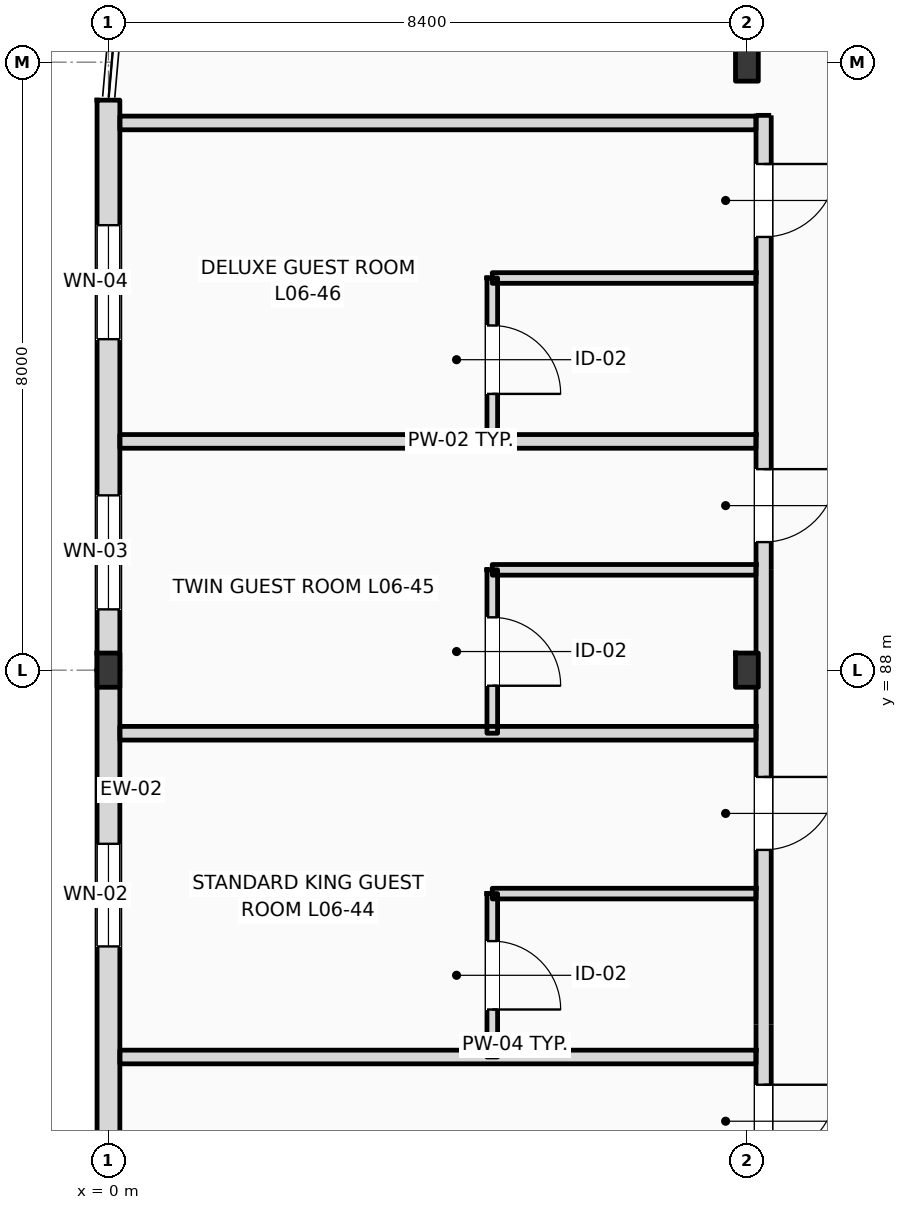
"""IFC4 building model, lengths in metres.
Left out: names, types, materials, properties, quantities, classifications, styles, units other than length and angle.
Written with IfcOpenShell. Run it as: python <this file> out.ifc"""

import sys

from ifc_helpers import new_model, si_unit, direction, frame, frame_2d, origin, origin_2d, place, context, subcontext, project, spatial, rectangle, i_section, extrude, element, fill, save


model = new_model("IFC4")
c1 = context("Model", 3, precision=1e-05, world=origin(), true_north=direction((0.0, 1.0)))
c2 = subcontext(c1, "Body", "Model", "MODEL_VIEW")
j1 = project(units=[si_unit("LENGTHUNIT", "METRE"), si_unit("PLANEANGLEUNIT", "RADIAN")], contexts=[c1])
p1 = place(None, origin())
s1 = spatial("IfcSite", under=j1, at=p1, CompositionType="ELEMENT")
p2 = place(p1, origin())
s2 = spatial("IfcBuilding", under=s1, at=p2, CompositionType="ELEMENT")
p3 = place(p2, frame((0.0, 0.0, 28.2)))
s3 = spatial("IfcBuildingStorey", under=s2, at=p3, CompositionType="ELEMENT", Elevation=28.2)
for number, where, z_axis, x_axis in (
    (1, (0.0, 88.0, 0.0), (0.0, 0.0, 1.0), (1.0, 0.0, 0.0)),
    (2, (8.4, 88.0, 0.0), (0.0, 0.0, 1.0), (1.0, 0.0, 0.0)),
):
    element("IfcColumn", number, at=place(p3, frame(where, z_axis=z_axis, x_axis=x_axis)), inside=s3, PredefinedType="COLUMN", context=c2, shape_type="SweptSolid", body=[
        extrude(i_section(OverallWidth=0.3, OverallDepth=0.45, WebThickness=0.014, FlangeThickness=0.026, FilletRadius=0.027, at=origin_2d()), origin(), (0.0, 0.0, 1.0), 3.6),
    ])
p4 = place(p3, frame((8.4, 96.0, 0.0), z_axis=(0.0, 0.0, 1.0), x_axis=(1.0, 0.0, 0.0)))
e3 = element("IfcColumn", 3, at=p4, inside=s3, PredefinedType="COLUMN", context=c2, shape_type="SweptSolid", body=[
    extrude(i_section(OverallWidth=0.3, OverallDepth=0.5, WebThickness=0.014, FlangeThickness=0.028, FilletRadius=0.027, at=origin_2d()), origin(), (0.0, 0.0, 1.0), 3.6),
])
p5 = place(p3, frame((0.0, 79.5, 0.0), z_axis=(0.0, 0.0, 1.0), x_axis=(0.0, 1.0, 0.0)))
e4 = element("IfcWall", 4, at=p5, inside=s3, PredefinedType="STANDARD", context=c2, shape_type="SweptSolid", body=[
    extrude(rectangle(XDim=8.5, YDim=0.3, at=frame_2d((4.25, 0.0))), origin(), (0.0, 0.0, 1.0), 2.99),
])
p6 = place(p5, frame((0.89, 0.0, 0.9)))
e5 = element("IfcOpeningElement", 5, at=p6, cuts=e4, PredefinedType="OPENING", context=c2, shape_type="SweptSolid", body=[
    extrude(rectangle(XDim=1.2, YDim=1.8, at=frame_2d((0.6, 0.9))), frame((0.0, 0.16, 0.0), z_axis=(0.0, -1.0, 0.0), x_axis=(1.0, 0.0, 0.0)), (0.0, 0.0, 1.0), 0.32),
])
p7 = place(p5, frame((4.865, 0.0, 0.9)))
e6 = element("IfcOpeningElement", 6, at=p7, cuts=e4, PredefinedType="OPENING", context=c2, shape_type="SweptSolid", body=[
    extrude(rectangle(XDim=1.35, YDim=1.85, at=frame_2d((0.675, 0.925))), frame((0.0, 0.16, 0.0), z_axis=(0.0, -1.0, 0.0), x_axis=(1.0, 0.0, 0.0)), (0.0, 0.0, 1.0), 0.32),
])
p8 = place(p3, frame((0.0, 88.0, 0.0), z_axis=(0.0, 0.0, 1.0), x_axis=(0.0, 1.0, 0.0)))
e7 = element("IfcWall", 7, at=p8, inside=s3, PredefinedType="STANDARD", context=c2, shape_type="SweptSolid", body=[
    extrude(rectangle(XDim=7.5, YDim=0.3, at=frame_2d((3.75, 0.0))), origin(), (0.0, 0.0, 1.0), 3.36),
])
p9 = place(p8, frame((0.8, 0.0, 0.9)))
e8 = element("IfcOpeningElement", 8, at=p9, cuts=e7, PredefinedType="OPENING", context=c2, shape_type="SweptSolid", body=[
    extrude(rectangle(XDim=1.5, YDim=1.9, at=frame_2d((0.75, 0.95))), frame((0.0, 0.16, 0.0), z_axis=(0.0, -1.0, 0.0), x_axis=(1.0, 0.0, 0.0)), (0.0, 0.0, 1.0), 0.32),
])
p10 = place(p8, frame((4.355, 0.0, 0.9)))
e9 = element("IfcOpeningElement", 9, at=p10, cuts=e7, PredefinedType="OPENING", context=c2, shape_type="SweptSolid", body=[
    extrude(rectangle(XDim=1.5, YDim=1.95, at=frame_2d((0.75, 0.975))), frame((0.0, 0.16, 0.0), z_axis=(0.0, -1.0, 0.0), x_axis=(1.0, 0.0, 0.0)), (0.0, 0.0, 1.0), 0.32),
])
p11 = place(p3, frame((8.62, 62.64, 0.0), z_axis=(0.0, 0.0, 1.0), x_axis=(0.0, 1.0, 0.0)))
e10 = element("IfcWall", 10, at=p11, inside=s3, PredefinedType="PARTITIONING", context=c2, shape_type="SweptSolid", body=[
    extrude(rectangle(XDim=32.66, YDim=0.2, at=frame_2d((16.33, 0.0))), origin(), (0.0, 0.0, 1.0), 2.99),
])
p12 = place(p11, frame((2.71, 0.0, 0.0)))
e11 = element("IfcOpeningElement", 11, at=p12, cuts=e10, PredefinedType="OPENING", context=c2, shape_type="SweptSolid", body=[
    extrude(rectangle(XDim=0.96, YDim=2.2, at=frame_2d((0.48, 1.1))), frame((0.0, 0.11, 0.0), z_axis=(0.0, -1.0, 0.0), x_axis=(1.0, 0.0, 0.0)), (0.0, 0.0, 1.0), 0.22),
])
p13 = place(p11, frame((4.645, 0.0, 0.0)))
e12 = element("IfcOpeningElement", 12, at=p13, cuts=e10, PredefinedType="OPENING", context=c2, shape_type="SweptSolid", body=[
    extrude(rectangle(XDim=0.96, YDim=2.2, at=frame_2d((0.48, 1.1))), frame((0.0, 0.11, 0.0), z_axis=(0.0, -1.0, 0.0), x_axis=(1.0, 0.0, 0.0)), (0.0, 0.0, 1.0), 0.22),
])
p14 = place(p11, frame((10.845, 0.0, 0.0)))
e13 = element("IfcOpeningElement", 13, at=p14, cuts=e10, PredefinedType="OPENING", context=c2, shape_type="SweptSolid", body=[
    extrude(rectangle(XDim=0.96, YDim=2.2, at=frame_2d((0.48, 1.1))), frame((0.0, 0.11, 0.0), z_axis=(0.0, -1.0, 0.0), x_axis=(1.0, 0.0, 0.0)), (0.0, 0.0, 1.0), 0.22),
])
p15 = place(p11, frame((12.745, 0.0, 0.0)))
e14 = element("IfcOpeningElement", 14, at=p15, cuts=e10, PredefinedType="OPENING", context=c2, shape_type="SweptSolid", body=[
    extrude(rectangle(XDim=0.96, YDim=2.2, at=frame_2d((0.48, 1.1))), frame((0.0, 0.11, 0.0), z_axis=(0.0, -1.0, 0.0), x_axis=(1.0, 0.0, 0.0)), (0.0, 0.0, 1.0), 0.22),
])
p16 = place(p11, frame((18.945, 0.0, 0.0)))
e15 = element("IfcOpeningElement", 15, at=p16, cuts=e10, PredefinedType="OPENING", context=c2, shape_type="SweptSolid", body=[
    extrude(rectangle(XDim=0.96, YDim=2.2, at=frame_2d((0.48, 1.1))), frame((0.0, 0.11, 0.0), z_axis=(0.0, -1.0, 0.0), x_axis=(1.0, 0.0, 0.0)), (0.0, 0.0, 1.0), 0.22),
])
p17 = place(p11, frame((22.995, 0.0, 0.0)))
e16 = element("IfcOpeningElement", 16, at=p17, cuts=e10, PredefinedType="OPENING", context=c2, shape_type="SweptSolid", body=[
    extrude(rectangle(XDim=0.96, YDim=2.2, at=frame_2d((0.48, 1.1))), frame((0.0, 0.11, 0.0), z_axis=(0.0, -1.0, 0.0), x_axis=(1.0, 0.0, 0.0)), (0.0, 0.0, 1.0), 0.22),
])
p18 = place(p11, frame((27.045, 0.0, 0.0)))
e17 = element("IfcOpeningElement", 17, at=p18, cuts=e10, PredefinedType="OPENING", context=c2, shape_type="SweptSolid", body=[
    extrude(rectangle(XDim=0.96, YDim=2.2, at=frame_2d((0.48, 1.1))), frame((0.0, 0.11, 0.0), z_axis=(0.0, -1.0, 0.0), x_axis=(1.0, 0.0, 0.0)), (0.0, 0.0, 1.0), 0.22),
])
p19 = place(p11, frame((31.06, 0.0, 0.0)))
e18 = element("IfcOpeningElement", 18, at=p19, cuts=e10, PredefinedType="OPENING", context=c2, shape_type="SweptSolid", body=[
    extrude(rectangle(XDim=0.96, YDim=2.2, at=frame_2d((0.48, 1.1))), frame((0.0, 0.11, 0.0), z_axis=(0.0, -1.0, 0.0), x_axis=(1.0, 0.0, 0.0)), (0.0, 0.0, 1.0), 0.22),
])
for number, where, z_axis, x_axis in (
    (19, (0.15, 82.91, 0.0), (0.0, 0.0, 1.0), (1.0, 0.0, 0.0)),
    (20, (0.15, 87.17, 0.0), (0.0, 0.0, 1.0), (1.0, 0.0, 0.0)),
):
    element("IfcWall", number, at=place(p3, frame(where, z_axis=z_axis, x_axis=x_axis)), inside=s3, PredefinedType="PARTITIONING", context=c2, shape_type="SweptSolid", body=[
        extrude(rectangle(XDim=8.37, YDim=0.18, at=frame_2d((4.185, 0.0))), origin(), (0.0, 0.0, 1.0), 3.36),
    ])
p20 = place(p3, frame((5.05, 85.06, 0.0), z_axis=(0.0, 0.0, 1.0), x_axis=(1.0, 0.0, 0.0)))
e21 = element("IfcWall", 21, at=p20, inside=s3, PredefinedType="PARTITIONING", context=c2, shape_type="SweptSolid", body=[
    extrude(rectangle(XDim=3.47, YDim=0.14, at=frame_2d((1.735, 0.0))), origin(), (0.0, 0.0, 1.0), 3.36),
])
p21 = place(p3, frame((5.05, 82.91, 0.0), z_axis=(0.0, 0.0, 1.0), x_axis=(0.0, 1.0, 0.0)))
e22 = element("IfcWall", 22, at=p21, inside=s3, PredefinedType="PARTITIONING", context=c2, shape_type="SweptSolid", body=[
    extrude(rectangle(XDim=2.15, YDim=0.14, at=frame_2d((1.075, 0.0))), origin(), (0.0, 0.0, 1.0), 3.36),
])
p22 = place(p21, frame((0.625, 0.0, 0.0)))
e23 = element("IfcOpeningElement", 23, at=p22, cuts=e22, PredefinedType="OPENING", context=c2, shape_type="SweptSolid", body=[
    extrude(rectangle(XDim=0.9, YDim=2.1, at=frame_2d((0.45, 1.05))), frame((0.0, 0.08, 0.0), z_axis=(0.0, -1.0, 0.0), x_axis=(1.0, 0.0, 0.0)), (0.0, 0.0, 1.0), 0.16),
])
p23 = place(p3, frame((0.15, 91.01, 0.0), z_axis=(0.0, 0.0, 1.0), x_axis=(1.0, 0.0, 0.0)))
e24 = element("IfcWall", 24, at=p23, inside=s3, PredefinedType="PARTITIONING", context=c2, shape_type="SweptSolid", body=[
    extrude(rectangle(XDim=8.37, YDim=0.18, at=frame_2d((4.185, 0.0))), origin(), (0.0, 0.0, 1.0), 3.36),
])
p24 = place(p3, frame((5.05, 89.32, 0.0), z_axis=(0.0, 0.0, 1.0), x_axis=(1.0, 0.0, 0.0)))
e25 = element("IfcWall", 25, at=p24, inside=s3, PredefinedType="PARTITIONING", context=c2, shape_type="SweptSolid", body=[
    extrude(rectangle(XDim=3.47, YDim=0.14, at=frame_2d((1.735, 0.0))), origin(), (0.0, 0.0, 1.0), 3.36),
])
p25 = place(p3, frame((5.05, 87.17, 0.0), z_axis=(0.0, 0.0, 1.0), x_axis=(0.0, 1.0, 0.0)))
e26 = element("IfcWall", 26, at=p25, inside=s3, PredefinedType="PARTITIONING", context=c2, shape_type="SweptSolid", body=[
    extrude(rectangle(XDim=2.15, YDim=0.14, at=frame_2d((1.075, 0.0))), origin(), (0.0, 0.0, 1.0), 3.36),
])
p26 = place(p25, frame((0.625, 0.0, 0.0)))
e27 = element("IfcOpeningElement", 27, at=p26, cuts=e26, PredefinedType="OPENING", context=c2, shape_type="SweptSolid", body=[
    extrude(rectangle(XDim=0.9, YDim=2.1, at=frame_2d((0.45, 1.05))), frame((0.0, 0.08, 0.0), z_axis=(0.0, -1.0, 0.0), x_axis=(1.0, 0.0, 0.0)), (0.0, 0.0, 1.0), 0.16),
])
p27 = place(p3, frame((0.15, 95.2, 0.0), z_axis=(0.0, 0.0, 1.0), x_axis=(1.0, 0.0, 0.0)))
e28 = element("IfcWall", 28, at=p27, inside=s3, PredefinedType="PARTITIONING", context=c2, shape_type="SweptSolid", body=[
    extrude(rectangle(XDim=8.37, YDim=0.18, at=frame_2d((4.185, 0.0))), origin(), (0.0, 0.0, 1.0), 3.36),
])
p28 = place(p3, frame((5.05, 93.16, 0.0), z_axis=(0.0, 0.0, 1.0), x_axis=(1.0, 0.0, 0.0)))
e29 = element("IfcWall", 29, at=p28, inside=s3, PredefinedType="PARTITIONING", context=c2, shape_type="SweptSolid", body=[
    extrude(rectangle(XDim=3.47, YDim=0.14, at=frame_2d((1.735, 0.0))), origin(), (0.0, 0.0, 1.0), 3.36),
])
p29 = place(p3, frame((5.05, 91.01, 0.0), z_axis=(0.0, 0.0, 1.0), x_axis=(0.0, 1.0, 0.0)))
e30 = element("IfcWall", 30, at=p29, inside=s3, PredefinedType="PARTITIONING", context=c2, shape_type="SweptSolid", body=[
    extrude(rectangle(XDim=2.15, YDim=0.14, at=frame_2d((1.075, 0.0))), origin(), (0.0, 0.0, 1.0), 3.36),
])
p30 = place(p29, frame((0.625, 0.0, 0.0)))
e31 = element("IfcOpeningElement", 31, at=p30, cuts=e30, PredefinedType="OPENING", context=c2, shape_type="SweptSolid", body=[
    extrude(rectangle(XDim=0.9, YDim=2.1, at=frame_2d((0.45, 1.05))), frame((0.0, 0.08, 0.0), z_axis=(0.0, -1.0, 0.0), x_axis=(1.0, 0.0, 0.0)), (0.0, 0.0, 1.0), 0.16),
])
p31 = place(p7, origin())
e32 = element("IfcWindow", 32, at=p31, inside=s3, PartitioningType="DOUBLE_PANEL_VERTICAL", PredefinedType="WINDOW", context=c2, shape_type="SweptSolid", body=[
    extrude(rectangle(XDim=1.35, YDim=1.85, at=frame_2d((0.675, 0.925))), frame((0.0, 0.03, 0.0), z_axis=(0.0, -1.0, 0.0), x_axis=(1.0, 0.0, 0.0)), (0.0, 0.0, 1.0), 0.06),
])
fill(e6, e32)
p32 = place(p9, origin())
e33 = element("IfcWindow", 33, at=p32, inside=s3, PartitioningType="DOUBLE_PANEL_VERTICAL", PredefinedType="WINDOW", context=c2, shape_type="SweptSolid", body=[
    extrude(rectangle(XDim=1.5, YDim=1.9, at=frame_2d((0.75, 0.95))), frame((0.0, 0.03, 0.0), z_axis=(0.0, -1.0, 0.0), x_axis=(1.0, 0.0, 0.0)), (0.0, 0.0, 1.0), 0.06),
])
fill(e8, e33)
p33 = place(p10, origin())
e34 = element("IfcWindow", 34, at=p33, inside=s3, PartitioningType="DOUBLE_PANEL_VERTICAL", PredefinedType="WINDOW", context=c2, shape_type="SweptSolid", body=[
    extrude(rectangle(XDim=1.5, YDim=1.95, at=frame_2d((0.75, 0.975))), frame((0.0, 0.03, 0.0), z_axis=(0.0, -1.0, 0.0), x_axis=(1.0, 0.0, 0.0)), (0.0, 0.0, 1.0), 0.06),
])
fill(e9, e34)
p34 = place(p16, frame((0.96, 0.0, 0.0), z_axis=(0.0, 0.0, 1.0), x_axis=(-1.0, 0.0, 0.0)))
e35 = element("IfcDoor", 35, at=p34, inside=s3, OperationType="SINGLE_SWING_RIGHT", PredefinedType="DOOR", context=c2, shape_type="SweptSolid", body=[
    extrude(rectangle(XDim=0.96, YDim=2.2, at=frame_2d((0.48, 1.1))), frame((0.0, 0.025, 0.0), z_axis=(0.0, -1.0, 0.0), x_axis=(1.0, 0.0, 0.0)), (0.0, 0.0, 1.0), 0.05),
])
fill(e15, e35)
p35 = place(p17, frame((0.96, 0.0, 0.0), z_axis=(0.0, 0.0, 1.0), x_axis=(-1.0, 0.0, 0.0)))
e36 = element("IfcDoor", 36, at=p35, inside=s3, OperationType="SINGLE_SWING_RIGHT", PredefinedType="DOOR", context=c2, shape_type="SweptSolid", body=[
    extrude(rectangle(XDim=0.96, YDim=2.2, at=frame_2d((0.48, 1.1))), frame((0.0, 0.025, 0.0), z_axis=(0.0, -1.0, 0.0), x_axis=(1.0, 0.0, 0.0)), (0.0, 0.0, 1.0), 0.05),
])
fill(e16, e36)
p36 = place(p22, frame((0.9, 0.0, 0.0), z_axis=(0.0, 0.0, 1.0), x_axis=(-1.0, 0.0, 0.0)))
e37 = element("IfcDoor", 37, at=p36, inside=s3, OperationType="SINGLE_SWING_LEFT", PredefinedType="DOOR", context=c2, shape_type="SweptSolid", body=[
    extrude(rectangle(XDim=0.9, YDim=2.1, at=frame_2d((0.45, 1.05))), frame((0.0, 0.025, 0.0), z_axis=(0.0, -1.0, 0.0), x_axis=(1.0, 0.0, 0.0)), (0.0, 0.0, 1.0), 0.05),
])
fill(e23, e37)
p37 = place(p18, frame((0.96, 0.0, 0.0), z_axis=(0.0, 0.0, 1.0), x_axis=(-1.0, 0.0, 0.0)))
e38 = element("IfcDoor", 38, at=p37, inside=s3, OperationType="SINGLE_SWING_RIGHT", PredefinedType="DOOR", context=c2, shape_type="SweptSolid", body=[
    extrude(rectangle(XDim=0.96, YDim=2.2, at=frame_2d((0.48, 1.1))), frame((0.0, 0.025, 0.0), z_axis=(0.0, -1.0, 0.0), x_axis=(1.0, 0.0, 0.0)), (0.0, 0.0, 1.0), 0.05),
])
fill(e17, e38)
p38 = place(p26, frame((0.9, 0.0, 0.0), z_axis=(0.0, 0.0, 1.0), x_axis=(-1.0, 0.0, 0.0)))
e39 = element("IfcDoor", 39, at=p38, inside=s3, OperationType="SINGLE_SWING_LEFT", PredefinedType="DOOR", context=c2, shape_type="SweptSolid", body=[
    extrude(rectangle(XDim=0.9, YDim=2.1, at=frame_2d((0.45, 1.05))), frame((0.0, 0.025, 0.0), z_axis=(0.0, -1.0, 0.0), x_axis=(1.0, 0.0, 0.0)), (0.0, 0.0, 1.0), 0.05),
])
fill(e27, e39)
p39 = place(p19, frame((0.96, 0.0, 0.0), z_axis=(0.0, 0.0, 1.0), x_axis=(-1.0, 0.0, 0.0)))
e40 = element("IfcDoor", 40, at=p39, inside=s3, OperationType="SINGLE_SWING_RIGHT", PredefinedType="DOOR", context=c2, shape_type="SweptSolid", body=[
    extrude(rectangle(XDim=0.96, YDim=2.2, at=frame_2d((0.48, 1.1))), frame((0.0, 0.025, 0.0), z_axis=(0.0, -1.0, 0.0), x_axis=(1.0, 0.0, 0.0)), (0.0, 0.0, 1.0), 0.05),
])
fill(e18, e40)
p40 = place(p30, frame((0.9, 0.0, 0.0), z_axis=(0.0, 0.0, 1.0), x_axis=(-1.0, 0.0, 0.0)))
e41 = element("IfcDoor", 41, at=p40, inside=s3, OperationType="SINGLE_SWING_LEFT", PredefinedType="DOOR", context=c2, shape_type="SweptSolid", body=[
    extrude(rectangle(XDim=0.9, YDim=2.1, at=frame_2d((0.45, 1.05))), frame((0.0, 0.025, 0.0), z_axis=(0.0, -1.0, 0.0), x_axis=(1.0, 0.0, 0.0)), (0.0, 0.0, 1.0), 0.05),
])
fill(e31, e41)
save(model, sys.argv[1])
